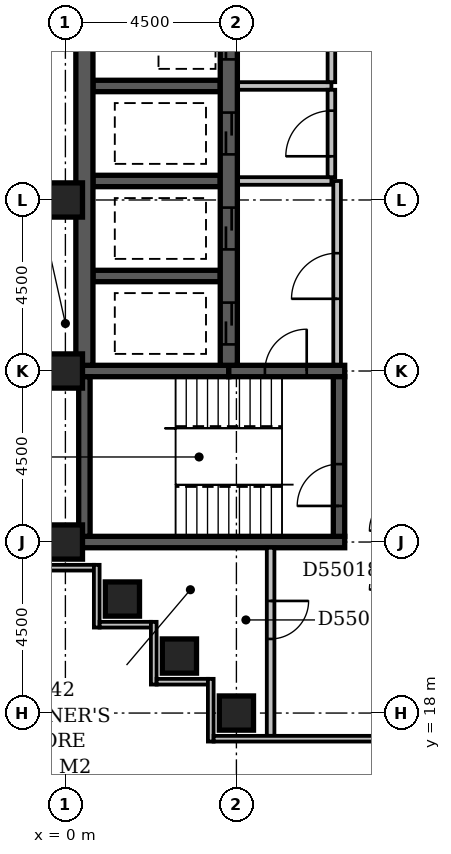
"""IFC4 building model, lengths in metres.
Left out: names, types, materials, properties, quantities, classifications, styles, units other than length and angle.
Written with IfcOpenShell. Run it as: python <this file> out.ifc"""

import sys

from ifc_helpers import new_model, si_unit, direction, frame, frame_2d, origin, origin_2d, place, context, subcontext, project, spatial, rectangle, extrude, element, fill, save


model = new_model("IFC4")
c1 = context("Model", 3, precision=1e-05, world=origin(), true_north=direction((0.0, 1.0)))
c2 = subcontext(c1, "Body", "Model", "MODEL_VIEW")
j1 = project(units=[si_unit("LENGTHUNIT", "METRE"), si_unit("PLANEANGLEUNIT", "RADIAN")], contexts=[c1])
p1 = place(None, origin())
s1 = spatial("IfcSite", under=j1, at=p1, CompositionType="ELEMENT")
p2 = place(p1, origin())
s2 = spatial("IfcBuilding", under=s1, at=p2, CompositionType="ELEMENT")
p3 = place(p2, frame((0.0, 0.0, 215.0)))
s3 = spatial("IfcBuildingStorey", under=s2, at=p3, CompositionType="ELEMENT", Elevation=215.0)
p4 = place(p3, frame((0.35, 22.5, -0.3), z_axis=(0.0, 0.0, 1.0), x_axis=(1.0, 0.0, 0.0)))
e1 = element("IfcWall", 1, at=p4, inside=s3, PredefinedType="SHEAR", context=c2, shape_type="SweptSolid", body=[
    extrude(rectangle(XDim=7.0, YDim=0.3, at=frame_2d((3.5, 0.0))), origin(), (0.0, 0.0, 1.0), 3.6),
])
p5 = place(p3, frame((0.35, 27.0, -0.3), z_axis=(0.0, 0.0, 1.0), x_axis=(1.0, 0.0, 0.0)))
e2 = element("IfcWall", 2, at=p5, inside=s3, PredefinedType="SHEAR", context=c2, shape_type="SweptSolid", body=[
    extrude(rectangle(XDim=3.95, YDim=0.3, at=frame_2d((1.975, 0.0))), origin(), (0.0, 0.0, 1.0), 3.6),
])
p6 = place(p3, frame((0.5, 22.65, -0.3), z_axis=(0.0, 0.0, 1.0), x_axis=(0.0, 1.0, 0.0)))
e3 = element("IfcWall", 3, at=p6, inside=s3, PredefinedType="SHEAR", context=c2, shape_type="SweptSolid", body=[
    extrude(rectangle(XDim=4.2, YDim=0.3, at=frame_2d((2.1, 0.0))), origin(), (0.0, 0.0, 1.0), 3.6),
])
p7 = place(p3, frame((0.5, 27.15, -0.3), z_axis=(0.0, 0.0, 1.0), x_axis=(0.0, 1.0, 0.0)))
e4 = element("IfcWall", 4, at=p7, inside=s3, PredefinedType="SHEAR", context=c2, shape_type="SweptSolid", body=[
    extrude(rectangle(XDim=22.125, YDim=0.45, at=frame_2d((11.062, 0.0))), origin(), (0.0, 0.0, 1.0), 3.6),
])
for number, where, z_axis, x_axis in (
    (5, (0.725, 29.5, -0.3), (0.0, 0.0, 1.0), (1.0, 0.0, 0.0)),
    (6, (0.725, 32.0, -0.3), (0.0, 0.0, 1.0), (1.0, 0.0, 0.0)),
    (7, (0.725, 34.5, -0.3), (0.0, 0.0, 1.0), (1.0, 0.0, 0.0)),
):
    element("IfcWall", number, at=place(p3, frame(where, z_axis=z_axis, x_axis=x_axis)), inside=s3, PredefinedType="SHEAR", context=c2, shape_type="SweptSolid", body=[
        extrude(rectangle(XDim=3.35, YDim=0.3, at=frame_2d((1.675, 0.0))), origin(), (0.0, 0.0, 1.0), 3.6),
    ])
p8 = place(p3, frame((4.3, 27.0, -0.3), z_axis=(0.0, 0.0, 1.0), x_axis=(1.0, 0.0, 0.0)))
e8 = element("IfcWall", 8, at=p8, inside=s3, PredefinedType="SHEAR", context=c2, shape_type="SweptSolid", body=[
    extrude(rectangle(XDim=3.05, YDim=0.3, at=frame_2d((1.525, 0.0))), origin(), (0.0, 0.0, 1.0), 3.6),
])
p9 = place(p8, frame((0.95, 0.0, 0.3)))
e9 = element("IfcOpeningElement", 9, at=p9, cuts=e8, PredefinedType="OPENING", context=c2, shape_type="SweptSolid", body=[
    extrude(rectangle(XDim=1.1, YDim=2.1, at=frame_2d((0.55, 1.05))), frame((0.0, 0.162, 0.0), z_axis=(0.0, -1.0, 0.0), x_axis=(1.0, 0.0, 0.0)), (0.0, 0.0, 1.0), 0.324),
])
p10 = place(p3, frame((4.3, 27.15, -0.3), z_axis=(0.0, 0.0, 1.0), x_axis=(0.0, 1.0, 0.0)))
e10 = element("IfcWall", 10, at=p10, inside=s3, PredefinedType="SHEAR", context=c2, shape_type="SweptSolid", body=[
    extrude(rectangle(XDim=22.125, YDim=0.45, at=frame_2d((11.062, 0.0))), origin(), (0.0, 0.0, 1.0), 3.6),
])
p11 = place(p10, frame((3.05, 0.0, 0.3)))
e11 = element("IfcOpeningElement", 11, at=p11, cuts=e10, PredefinedType="OPENING", context=c2, shape_type="SweptSolid", body=[
    extrude(rectangle(XDim=1.1, YDim=2.1, at=frame_2d((0.55, 1.05))), frame((0.0, 0.237, 0.0), z_axis=(0.0, -1.0, 0.0), x_axis=(1.0, 0.0, 0.0)), (0.0, 0.0, 1.0), 0.474),
])
p12 = place(p10, frame((0.55, 0.0, 0.3)))
e12 = element("IfcOpeningElement", 12, at=p12, cuts=e10, PredefinedType="OPENING", context=c2, shape_type="SweptSolid", body=[
    extrude(rectangle(XDim=1.1, YDim=2.1, at=frame_2d((0.55, 1.05))), frame((0.0, 0.237, 0.0), z_axis=(0.0, -1.0, 0.0), x_axis=(1.0, 0.0, 0.0)), (0.0, 0.0, 1.0), 0.474),
])
p13 = place(p10, frame((20.55, 0.0, 0.3)))
e13 = element("IfcOpeningElement", 13, at=p13, cuts=e10, PredefinedType="OPENING", context=c2, shape_type="SweptSolid", body=[
    extrude(rectangle(XDim=1.1, YDim=2.1, at=frame_2d((0.55, 1.05))), frame((0.0, 0.237, 0.0), z_axis=(0.0, -1.0, 0.0), x_axis=(1.0, 0.0, 0.0)), (0.0, 0.0, 1.0), 0.474),
])
p14 = place(p10, frame((18.05, 0.0, 0.3)))
e14 = element("IfcOpeningElement", 14, at=p14, cuts=e10, PredefinedType="OPENING", context=c2, shape_type="SweptSolid", body=[
    extrude(rectangle(XDim=1.1, YDim=2.1, at=frame_2d((0.55, 1.05))), frame((0.0, 0.237, 0.0), z_axis=(0.0, -1.0, 0.0), x_axis=(1.0, 0.0, 0.0)), (0.0, 0.0, 1.0), 0.474),
])
p15 = place(p10, frame((15.55, 0.0, 0.3)))
e15 = element("IfcOpeningElement", 15, at=p15, cuts=e10, PredefinedType="OPENING", context=c2, shape_type="SweptSolid", body=[
    extrude(rectangle(XDim=1.1, YDim=2.1, at=frame_2d((0.55, 1.05))), frame((0.0, 0.237, 0.0), z_axis=(0.0, -1.0, 0.0), x_axis=(1.0, 0.0, 0.0)), (0.0, 0.0, 1.0), 0.474),
])
p16 = place(p10, frame((13.05, 0.0, 0.3)))
e16 = element("IfcOpeningElement", 16, at=p16, cuts=e10, PredefinedType="OPENING", context=c2, shape_type="SweptSolid", body=[
    extrude(rectangle(XDim=1.1, YDim=2.1, at=frame_2d((0.55, 1.05))), frame((0.0, 0.237, 0.0), z_axis=(0.0, -1.0, 0.0), x_axis=(1.0, 0.0, 0.0)), (0.0, 0.0, 1.0), 0.474),
])
p17 = place(p10, frame((10.55, 0.0, 0.3)))
e17 = element("IfcOpeningElement", 17, at=p17, cuts=e10, PredefinedType="OPENING", context=c2, shape_type="SweptSolid", body=[
    extrude(rectangle(XDim=1.1, YDim=2.1, at=frame_2d((0.55, 1.05))), frame((0.0, 0.237, 0.0), z_axis=(0.0, -1.0, 0.0), x_axis=(1.0, 0.0, 0.0)), (0.0, 0.0, 1.0), 0.474),
])
p18 = place(p10, frame((8.05, 0.0, 0.3)))
e18 = element("IfcOpeningElement", 18, at=p18, cuts=e10, PredefinedType="OPENING", context=c2, shape_type="SweptSolid", body=[
    extrude(rectangle(XDim=1.1, YDim=2.1, at=frame_2d((0.55, 1.05))), frame((0.0, 0.237, 0.0), z_axis=(0.0, -1.0, 0.0), x_axis=(1.0, 0.0, 0.0)), (0.0, 0.0, 1.0), 0.474),
])
p19 = place(p10, frame((5.55, 0.0, 0.3)))
e19 = element("IfcOpeningElement", 19, at=p19, cuts=e10, PredefinedType="OPENING", context=c2, shape_type="SweptSolid", body=[
    extrude(rectangle(XDim=1.1, YDim=2.1, at=frame_2d((0.55, 1.05))), frame((0.0, 0.237, 0.0), z_axis=(0.0, -1.0, 0.0), x_axis=(1.0, 0.0, 0.0)), (0.0, 0.0, 1.0), 0.474),
])
p20 = place(p3, frame((7.2, 22.65, -0.3), z_axis=(0.0, 0.0, 1.0), x_axis=(0.0, 1.0, 0.0)))
e20 = element("IfcWall", 20, at=p20, inside=s3, PredefinedType="SHEAR", context=c2, shape_type="SweptSolid", body=[
    extrude(rectangle(XDim=4.2, YDim=0.3, at=frame_2d((2.1, 0.0))), origin(), (0.0, 0.0, 1.0), 3.6),
])
p21 = place(p20, frame((0.8, 0.0, 0.3)))
e21 = element("IfcOpeningElement", 21, at=p21, cuts=e20, PredefinedType="OPENING", context=c2, shape_type="SweptSolid", body=[
    extrude(rectangle(XDim=1.1, YDim=2.1, at=frame_2d((0.55, 1.05))), frame((0.0, 0.162, 0.0), z_axis=(0.0, -1.0, 0.0), x_axis=(1.0, 0.0, 0.0)), (0.0, 0.0, 1.0), 0.324),
])
for number, where, z_axis, x_axis in (
    (22, (4.5, 18.0, -0.3), (0.0, 0.0, 1.0), (1.0, 0.0, 0.0)),
    (23, (3.0, 19.5, -0.3), (0.0, 0.0, 1.0), (1.0, 0.0, 0.0)),
    (24, (1.5, 21.0, -0.3), (0.0, 0.0, 1.0), (1.0, 0.0, 0.0)),
    (25, (0.0, 22.5, -0.3), (0.0, 0.0, 1.0), (1.0, 0.0, 0.0)),
    (26, (0.0, 27.0, -0.3), (0.0, 0.0, 1.0), (1.0, 0.0, 0.0)),
    (27, (0.0, 31.5, -0.3), (0.0, 0.0, 1.0), (1.0, 0.0, 0.0)),
):
    element("IfcColumn", number, at=place(p3, frame(where, z_axis=z_axis, x_axis=x_axis)), inside=s3, PredefinedType="COLUMN", context=c2, shape_type="SweptSolid", body=[
        extrude(rectangle(XDim=0.9, YDim=0.9, at=origin_2d()), origin(), (0.0, 0.0, 1.0), 3.6),
    ])
p22 = place(p3, frame((-0.6, 21.825, 0.0), z_axis=(0.0, 0.0, 1.0), x_axis=(1.0, 0.0, 0.0)))
e28 = element("IfcWall", 28, at=p22, inside=s3, PredefinedType="STANDARD", context=c2, shape_type="SweptSolid", body=[
    extrude(rectangle(XDim=1.35, YDim=0.15, at=frame_2d((0.675, 0.0))), origin(), (0.0, 0.0, 1.0), 2.7),
])
p23 = place(p3, frame((0.825, 21.9, 0.0), z_axis=(0.0, 0.0, 1.0), x_axis=(0.0, -1.0, 0.0)))
e29 = element("IfcWall", 29, at=p23, inside=s3, PredefinedType="STANDARD", context=c2, shape_type="SweptSolid", body=[
    extrude(rectangle(XDim=1.65, YDim=0.15, at=frame_2d((0.825, 0.0))), origin(), (0.0, 0.0, 1.0), 2.7),
])
p24 = place(p3, frame((0.9, 20.325, 0.0), z_axis=(0.0, 0.0, 1.0), x_axis=(1.0, 0.0, 0.0)))
e30 = element("IfcWall", 30, at=p24, inside=s3, PredefinedType="STANDARD", context=c2, shape_type="SweptSolid", body=[
    extrude(rectangle(XDim=1.35, YDim=0.15, at=frame_2d((0.675, 0.0))), origin(), (0.0, 0.0, 1.0), 2.7),
])
p25 = place(p3, frame((2.325, 20.4, 0.0), z_axis=(0.0, 0.0, 1.0), x_axis=(0.0, -1.0, 0.0)))
e31 = element("IfcWall", 31, at=p25, inside=s3, PredefinedType="STANDARD", context=c2, shape_type="SweptSolid", body=[
    extrude(rectangle(XDim=1.65, YDim=0.15, at=frame_2d((0.825, 0.0))), origin(), (0.0, 0.0, 1.0), 2.7),
])
p26 = place(p3, frame((2.4, 18.825, 0.0), z_axis=(0.0, 0.0, 1.0), x_axis=(1.0, 0.0, 0.0)))
e32 = element("IfcWall", 32, at=p26, inside=s3, PredefinedType="STANDARD", context=c2, shape_type="SweptSolid", body=[
    extrude(rectangle(XDim=1.35, YDim=0.15, at=frame_2d((0.675, 0.0))), origin(), (0.0, 0.0, 1.0), 2.7),
])
p27 = place(p3, frame((3.825, 18.9, 0.0), z_axis=(0.0, 0.0, 1.0), x_axis=(0.0, -1.0, 0.0)))
e33 = element("IfcWall", 33, at=p27, inside=s3, PredefinedType="STANDARD", context=c2, shape_type="SweptSolid", body=[
    extrude(rectangle(XDim=1.65, YDim=0.15, at=frame_2d((0.825, 0.0))), origin(), (0.0, 0.0, 1.0), 2.7),
])
p28 = place(p3, frame((3.9, 17.325, 0.0), z_axis=(0.0, 0.0, 1.0), x_axis=(1.0, 0.0, 0.0)))
e34 = element("IfcWall", 34, at=p28, inside=s3, PredefinedType="STANDARD", context=c2, shape_type="SweptSolid", body=[
    extrude(rectangle(XDim=19.35, YDim=0.15, at=frame_2d((9.675, 0.0))), origin(), (0.0, 0.0, 1.0), 2.7),
])
p29 = place(p28, frame((15.15, 0.0, 0.6)))
e35 = element("IfcOpeningElement", 35, at=p29, cuts=e34, PredefinedType="OPENING", context=c2, shape_type="SweptSolid", body=[
    extrude(rectangle(XDim=2.4, YDim=1.8, at=frame_2d((1.2, 0.9))), frame((0.0, 0.087, 0.0), z_axis=(0.0, -1.0, 0.0), x_axis=(1.0, 0.0, 0.0)), (0.0, 0.0, 1.0), 0.174),
])
p30 = place(p3, frame((4.545, 34.5, 0.0), z_axis=(0.0, 0.0, 1.0), x_axis=(1.0, 0.0, 0.0)))
e36 = element("IfcWall", 36, at=p30, inside=s3, PredefinedType="PARTITIONING", context=c2, shape_type="SweptSolid", body=[
    extrude(rectangle(XDim=2.455, YDim=0.2, at=frame_2d((1.228, 0.0))), origin(), (0.0, 0.0, 1.0), 3.3),
])
p31 = place(p3, frame((7.0, 34.6, 0.0), z_axis=(0.0, 0.0, 1.0), x_axis=(0.0, 1.0, 0.0)))
e37 = element("IfcWall", 37, at=p31, inside=s3, PredefinedType="PARTITIONING", context=c2, shape_type="SweptSolid", body=[
    extrude(rectangle(XDim=14.9, YDim=0.2, at=frame_2d((7.45, 0.0))), origin(), (0.0, 0.0, 1.0), 3.3),
])
p32 = place(p31, frame((2.8, 0.0, 0.0)))
e38 = element("IfcOpeningElement", 38, at=p32, cuts=e37, PredefinedType="OPENING", context=c2, shape_type="SweptSolid", body=[
    extrude(rectangle(XDim=1.2, YDim=2.1, at=frame_2d((0.6, 1.05))), frame((0.0, 0.112, 0.0), z_axis=(0.0, -1.0, 0.0), x_axis=(1.0, 0.0, 0.0)), (0.0, 0.0, 1.0), 0.224),
])
p33 = place(p31, frame((9.8, 0.0, 0.0)))
e39 = element("IfcOpeningElement", 39, at=p33, cuts=e37, PredefinedType="OPENING", context=c2, shape_type="SweptSolid", body=[
    extrude(rectangle(XDim=1.2, YDim=2.1, at=frame_2d((0.6, 1.05))), frame((0.0, 0.112, 0.0), z_axis=(0.0, -1.0, 0.0), x_axis=(1.0, 0.0, 0.0)), (0.0, 0.0, 1.0), 0.224),
])
p34 = place(p3, frame((4.545, 32.0, 0.0), z_axis=(0.0, 0.0, 1.0), x_axis=(1.0, 0.0, 0.0)))
e40 = element("IfcWall", 40, at=p34, inside=s3, PredefinedType="PARTITIONING", context=c2, shape_type="SweptSolid", body=[
    extrude(rectangle(XDim=2.455, YDim=0.2, at=frame_2d((1.228, 0.0))), origin(), (0.0, 0.0, 1.0), 3.3),
])
p35 = place(p3, frame((7.0, 32.1, 0.0), z_axis=(0.0, 0.0, 1.0), x_axis=(0.0, 1.0, 0.0)))
e41 = element("IfcWall", 41, at=p35, inside=s3, PredefinedType="PARTITIONING", context=c2, shape_type="SweptSolid", body=[
    extrude(rectangle(XDim=2.3, YDim=0.2, at=frame_2d((1.15, 0.0))), origin(), (0.0, 0.0, 1.0), 3.3),
])
p36 = place(p35, frame((0.55, 0.0, 0.0)))
e42 = element("IfcOpeningElement", 42, at=p36, cuts=e41, PredefinedType="OPENING", context=c2, shape_type="SweptSolid", body=[
    extrude(rectangle(XDim=1.2, YDim=2.1, at=frame_2d((0.6, 1.05))), frame((0.0, 0.112, 0.0), z_axis=(0.0, -1.0, 0.0), x_axis=(1.0, 0.0, 0.0)), (0.0, 0.0, 1.0), 0.224),
])
p37 = place(p3, frame((7.15, 27.17, 0.0), z_axis=(0.0, 0.0, 1.0), x_axis=(0.0, 1.0, 0.0)))
e43 = element("IfcWall", 43, at=p37, inside=s3, PredefinedType="PARTITIONING", context=c2, shape_type="SweptSolid", body=[
    extrude(rectangle(XDim=4.83, YDim=0.2, at=frame_2d((2.415, 0.0))), origin(), (0.0, 0.0, 1.0), 3.3),
])
p38 = place(p37, frame((1.73, 0.0, 0.0)))
e44 = element("IfcOpeningElement", 44, at=p38, cuts=e43, PredefinedType="OPENING", context=c2, shape_type="SweptSolid", body=[
    extrude(rectangle(XDim=1.2, YDim=2.1, at=frame_2d((0.6, 1.05))), frame((0.0, 0.112, 0.0), z_axis=(0.0, -1.0, 0.0), x_axis=(1.0, 0.0, 0.0)), (0.0, 0.0, 1.0), 0.224),
])
p39 = place(p3, frame((5.4, 17.4, 0.0), z_axis=(0.0, 0.0, 1.0), x_axis=(0.0, 1.0, 0.0)))
e45 = element("IfcWall", 45, at=p39, inside=s3, PredefinedType="PARTITIONING", context=c2, shape_type="SweptSolid", body=[
    extrude(rectangle(XDim=4.95, YDim=0.2, at=frame_2d((2.475, 0.0))), origin(), (0.0, 0.0, 1.0), 3.3),
])
p40 = place(p39, frame((2.55, 0.0, 0.0)))
e46 = element("IfcOpeningElement", 46, at=p40, cuts=e45, PredefinedType="OPENING", context=c2, shape_type="SweptSolid", body=[
    extrude(rectangle(XDim=1.0, YDim=2.1, at=frame_2d((0.5, 1.05))), frame((0.0, 0.112, 0.0), z_axis=(0.0, -1.0, 0.0), x_axis=(1.0, 0.0, 0.0)), (0.0, 0.0, 1.0), 0.224),
])
p41 = place(p38, origin())
e47 = element("IfcDoor", 47, at=p41, inside=s3, OperationType="SINGLE_SWING_LEFT", PredefinedType="DOOR", context=c2, shape_type="SweptSolid", body=[
    extrude(rectangle(XDim=1.2, YDim=2.1, at=frame_2d((0.6, 1.05))), frame((0.0, 0.025, 0.0), z_axis=(0.0, -1.0, 0.0), x_axis=(1.0, 0.0, 0.0)), (0.0, 0.0, 1.0), 0.05),
])
fill(e44, e47)
p42 = place(p11, origin())
e48 = element("IfcDoor", 48, at=p42, inside=s3, OperationType="SLIDING_TO_LEFT", PredefinedType="DOOR", context=c2, shape_type="SweptSolid", body=[
    extrude(rectangle(XDim=1.1, YDim=2.1, at=frame_2d((0.55, 1.05))), frame((0.0, 0.025, 0.0), z_axis=(0.0, -1.0, 0.0), x_axis=(1.0, 0.0, 0.0)), (0.0, 0.0, 1.0), 0.05),
])
fill(e11, e48)
p43 = place(p12, origin())
e49 = element("IfcDoor", 49, at=p43, inside=s3, OperationType="SLIDING_TO_LEFT", PredefinedType="DOOR", context=c2, shape_type="SweptSolid", body=[
    extrude(rectangle(XDim=1.1, YDim=2.1, at=frame_2d((0.55, 1.05))), frame((0.0, 0.025, 0.0), z_axis=(0.0, -1.0, 0.0), x_axis=(1.0, 0.0, 0.0)), (0.0, 0.0, 1.0), 0.05),
])
fill(e12, e49)
p44 = place(p18, origin())
e50 = element("IfcDoor", 50, at=p44, inside=s3, OperationType="SLIDING_TO_LEFT", PredefinedType="DOOR", context=c2, shape_type="SweptSolid", body=[
    extrude(rectangle(XDim=1.1, YDim=2.1, at=frame_2d((0.55, 1.05))), frame((0.0, 0.025, 0.0), z_axis=(0.0, -1.0, 0.0), x_axis=(1.0, 0.0, 0.0)), (0.0, 0.0, 1.0), 0.05),
])
fill(e18, e50)
p45 = place(p36, origin())
e51 = element("IfcDoor", 51, at=p45, inside=s3, OperationType="SINGLE_SWING_LEFT", PredefinedType="DOOR", context=c2, shape_type="SweptSolid", body=[
    extrude(rectangle(XDim=1.2, YDim=2.1, at=frame_2d((0.6, 1.05))), frame((0.0, 0.025, 0.0), z_axis=(0.0, -1.0, 0.0), x_axis=(1.0, 0.0, 0.0)), (0.0, 0.0, 1.0), 0.05),
])
fill(e42, e51)
p46 = place(p19, origin())
e52 = element("IfcDoor", 52, at=p46, inside=s3, OperationType="SLIDING_TO_LEFT", PredefinedType="DOOR", context=c2, shape_type="SweptSolid", body=[
    extrude(rectangle(XDim=1.1, YDim=2.1, at=frame_2d((0.55, 1.05))), frame((0.0, 0.025, 0.0), z_axis=(0.0, -1.0, 0.0), x_axis=(1.0, 0.0, 0.0)), (0.0, 0.0, 1.0), 0.05),
])
fill(e19, e52)
p47 = place(p9, frame((1.1, 0.0, 0.0), z_axis=(0.0, 0.0, 1.0), x_axis=(-1.0, 0.0, 0.0)))
e53 = element("IfcDoor", 53, at=p47, inside=s3, OperationType="SINGLE_SWING_LEFT", PredefinedType="DOOR", context=c2, shape_type="SweptSolid", body=[
    extrude(rectangle(XDim=1.1, YDim=2.1, at=frame_2d((0.55, 1.05))), frame((0.0, 0.025, 0.0), z_axis=(0.0, -1.0, 0.0), x_axis=(1.0, 0.0, 0.0)), (0.0, 0.0, 1.0), 0.05),
])
fill(e9, e53)
p48 = place(p21, origin())
e54 = element("IfcDoor", 54, at=p48, inside=s3, OperationType="SINGLE_SWING_LEFT", PredefinedType="DOOR", context=c2, shape_type="SweptSolid", body=[
    extrude(rectangle(XDim=1.1, YDim=2.1, at=frame_2d((0.55, 1.05))), frame((0.0, 0.025, 0.0), z_axis=(0.0, -1.0, 0.0), x_axis=(1.0, 0.0, 0.0)), (0.0, 0.0, 1.0), 0.05),
])
fill(e21, e54)
p49 = place(p40, origin())
e55 = element("IfcDoor", 55, at=p49, inside=s3, OperationType="SINGLE_SWING_RIGHT", PredefinedType="DOOR", context=c2, shape_type="SweptSolid", body=[
    extrude(rectangle(XDim=1.0, YDim=2.1, at=frame_2d((0.5, 1.05))), frame((0.0, 0.025, 0.0), z_axis=(0.0, -1.0, 0.0), x_axis=(1.0, 0.0, 0.0)), (0.0, 0.0, 1.0), 0.05),
])
fill(e46, e55)
save(model, sys.argv[1])
